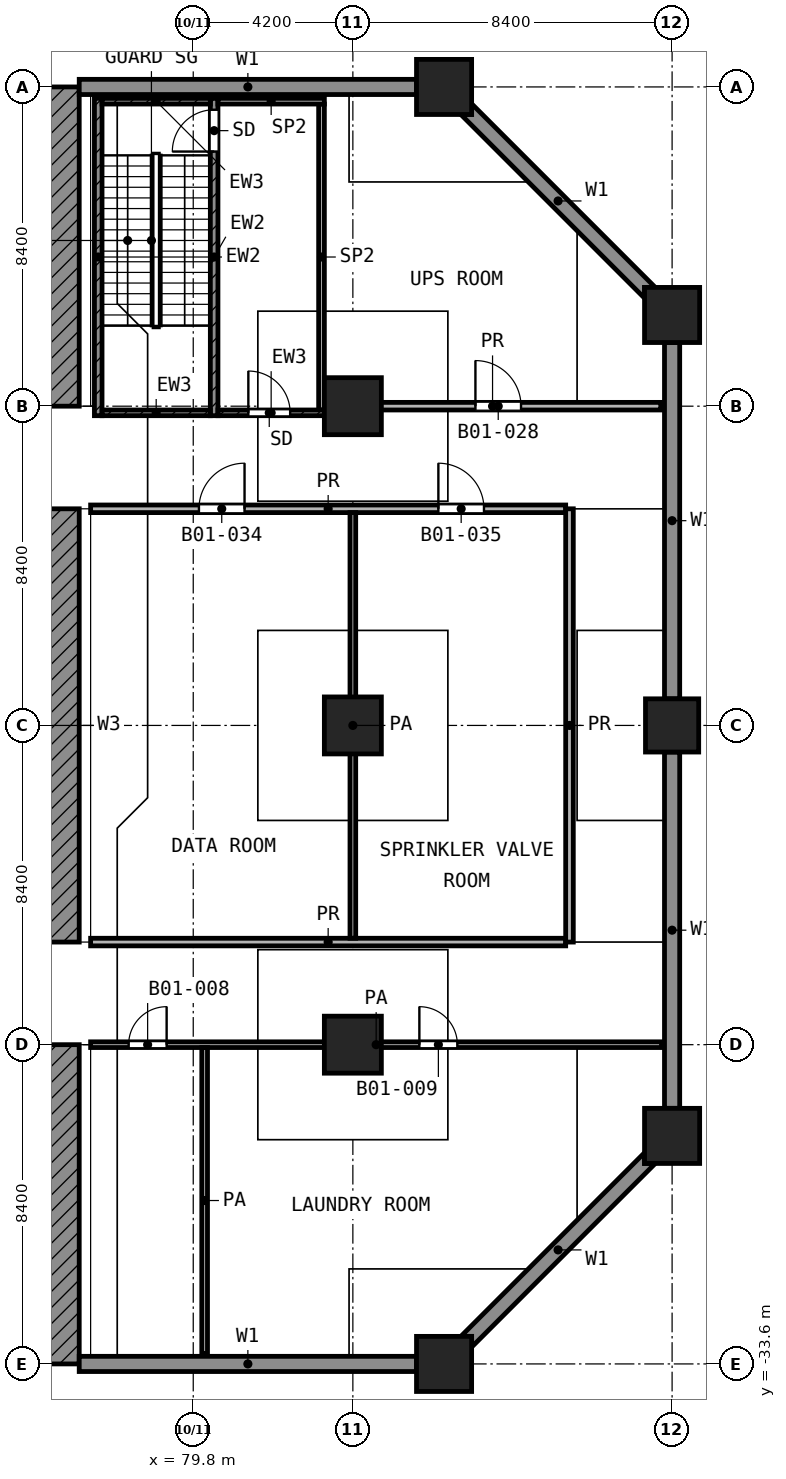
"""IFC4 building model, lengths in metres.
Left out: names, types, materials, properties, quantities, classifications, styles, units other than length and angle.
Written with IfcOpenShell. Run it as: python <this file> out.ifc"""

import sys

from ifc_helpers import new_model, si_unit, direction, frame, frame_2d, origin, origin_2d, place, context, subcontext, project, spatial, polyline, rectangle, outline, extrude, element, fill, save


model = new_model("IFC4")
c1 = context("Model", 3, precision=1e-05, world=origin(), true_north=direction((0.0, 1.0)))
c2 = subcontext(c1, "Body", "Model", "MODEL_VIEW")
j1 = project(units=[si_unit("LENGTHUNIT", "METRE"), si_unit("PLANEANGLEUNIT", "RADIAN")], contexts=[c1])
p1 = place(None, origin())
s1 = spatial("IfcSite", under=j1, at=p1, CompositionType="ELEMENT")
p2 = place(p1, origin())
s2 = spatial("IfcBuilding", under=s1, at=p2, CompositionType="ELEMENT")
p3 = place(p2, frame((0.0, 0.0, -6.0)))
s3 = spatial("IfcBuildingStorey", under=s2, at=p3, CompositionType="ELEMENT", Elevation=-6.0)
p4 = place(p3, origin())
e1 = element("IfcWall", 1, at=p4, inside=s3, PredefinedType="SOLIDWALL", context=c2, shape_type="SweptSolid", body=[
    extrude(outline(polyline([(85.675, -0.2), (76.8, -0.2), (76.8, 0.2), (85.675, 0.2), (85.675, -0.2)])), origin(), (0.0, 0.0, 1.0), 5.55),
])
e2 = element("IfcWall", 2, at=p4, inside=s3, PredefinedType="SOLIDWALL", context=c2, shape_type="SweptSolid", body=[
    extrude(outline(polyline([(91.675, -5.275), (91.675, -5.558), (86.842, -0.725), (87.125, -0.725), (87.125, -0.442), (91.958, -5.275), (91.675, -5.275)])), origin(), (0.0, 0.0, 1.0), 5.55),
])
e3 = element("IfcWall", 3, at=p4, inside=s3, PredefinedType="SOLIDWALL", context=c2, shape_type="SweptSolid", body=[
    extrude(outline(polyline([(92.2, -16.1), (92.2, -6.725), (92.6, -6.725), (92.6, -16.1), (92.2, -16.1)])), origin(), (0.0, 0.0, 1.0), 5.55),
])
e4 = element("IfcWall", 4, at=p4, inside=s3, PredefinedType="SOLIDWALL", context=c2, shape_type="SweptSolid", body=[
    extrude(outline(polyline([(92.2, -26.875), (92.2, -17.5), (92.6, -17.5), (92.6, -26.875), (92.2, -26.875)])), origin(), (0.0, 0.0, 1.0), 5.55),
])
e5 = element("IfcWall", 5, at=p4, inside=s3, PredefinedType="SOLIDWALL", context=c2, shape_type="SweptSolid", body=[
    extrude(outline(polyline([(87.125, -32.875), (86.842, -32.875), (91.675, -28.042), (91.675, -28.325), (91.958, -28.325), (87.125, -33.158), (87.125, -32.875)])), origin(), (0.0, 0.0, 1.0), 5.55),
])
e6 = element("IfcWall", 6, at=p4, inside=s3, PredefinedType="SOLIDWALL", context=c2, shape_type="SweptSolid", body=[
    extrude(outline(polyline([(76.8, -33.4), (85.675, -33.4), (85.675, -33.8), (76.8, -33.8), (76.8, -33.4)])), origin(), (0.0, 0.0, 1.0), 5.55),
])
for number, where, z_axis, x_axis in (
    (7, (86.4, 0.0, 0.0), (0.0, 0.0, 1.0), (1.0, 0.0, 0.0)),
    (8, (92.4, -6.0, 0.0), (0.0, 0.0, 1.0), (1.0, 0.0, 0.0)),
):
    element("IfcColumn", number, at=place(p3, frame(where, z_axis=z_axis, x_axis=x_axis)), inside=s3, PredefinedType="COLUMN", context=c2, shape_type="SweptSolid", body=[
        extrude(rectangle(XDim=1.45, YDim=1.45, at=origin_2d()), origin(), (0.0, 0.0, 1.0), 6.0),
    ])
for number, where, z_axis, x_axis in (
    (9, (84.0, -8.4, 0.0), (0.0, 0.0, 1.0), (1.0, 0.0, 0.0)),
    (10, (84.0, -16.8, 0.0), (0.0, 0.0, 1.0), (1.0, 0.0, 0.0)),
):
    element("IfcColumn", number, at=place(p3, frame(where, z_axis=z_axis, x_axis=x_axis)), inside=s3, PredefinedType="COLUMN", context=c2, shape_type="SweptSolid", body=[
        extrude(rectangle(XDim=1.5, YDim=1.5, at=origin_2d()), origin(), (0.0, 0.0, 1.0), 6.0),
    ])
p5 = place(p3, frame((92.4, -16.8, 0.0), z_axis=(0.0, 0.0, 1.0), x_axis=(1.0, 0.0, 0.0)))
e11 = element("IfcColumn", 11, at=p5, inside=s3, PredefinedType="COLUMN", context=c2, shape_type="SweptSolid", body=[
    extrude(rectangle(XDim=1.4, YDim=1.4, at=origin_2d()), origin(), (0.0, 0.0, 1.0), 6.0),
])
p6 = place(p3, frame((84.0, -25.2, 0.0), z_axis=(0.0, 0.0, 1.0), x_axis=(1.0, 0.0, 0.0)))
e12 = element("IfcColumn", 12, at=p6, inside=s3, PredefinedType="COLUMN", context=c2, shape_type="SweptSolid", body=[
    extrude(rectangle(XDim=1.5, YDim=1.5, at=origin_2d()), origin(), (0.0, 0.0, 1.0), 6.0),
])
for number, where, z_axis, x_axis in (
    (13, (92.4, -27.6, 0.0), (0.0, 0.0, 1.0), (1.0, 0.0, 0.0)),
    (14, (86.4, -33.6, 0.0), (0.0, 0.0, 1.0), (1.0, 0.0, 0.0)),
):
    element("IfcColumn", number, at=place(p3, frame(where, z_axis=z_axis, x_axis=x_axis)), inside=s3, PredefinedType="COLUMN", context=c2, shape_type="SweptSolid", body=[
        extrude(rectangle(XDim=1.45, YDim=1.45, at=origin_2d()), origin(), (0.0, 0.0, 1.0), 6.0),
    ])
p7 = place(p3, frame((0.0, 0.0, 6.0), z_axis=(0.0, -1.0, 0.0), x_axis=(1.0, 0.0, 0.0)))
e15 = element("IfcWall", 15, at=p7, inside=s3, PredefinedType="SHEAR", context=c2, shape_type="SweptSolid", body=[
    extrude(outline(polyline([(74.4, -6.0), (74.4, 0.0), (76.8, 0.0), (76.8, -6.0), (74.4, -6.0)])), origin(), (0.0, 0.0, 1.0), 8.4),
])
p8 = place(p3, frame((0.0, -11.1, 6.0), z_axis=(0.0, -1.0, 0.0), x_axis=(1.0, 0.0, 0.0)))
e16 = element("IfcWall", 16, at=p8, inside=s3, PredefinedType="SHEAR", context=c2, shape_type="SweptSolid", body=[
    extrude(outline(polyline([(74.4, -6.0), (74.4, 0.0), (76.8, 0.0), (76.8, -6.0), (74.4, -6.0)])), origin(), (0.0, 0.0, 1.0), 11.4),
])
p9 = place(p3, frame((0.0, -25.2, 6.0), z_axis=(0.0, -1.0, 0.0), x_axis=(1.0, 0.0, 0.0)))
e17 = element("IfcWall", 17, at=p9, inside=s3, PredefinedType="SHEAR", context=c2, shape_type="SweptSolid", body=[
    extrude(outline(polyline([(74.4, -6.0), (74.4, 0.0), (76.8, 0.0), (76.8, -6.0), (74.4, -6.0)])), origin(), (0.0, 0.0, 1.0), 8.4),
])
p10 = place(p3, frame((77.3, -8.65, 0.0), z_axis=(0.0, 0.0, 1.0), x_axis=(0.0, 1.0, 0.0)))
e18 = element("IfcWall", 18, at=p10, inside=s3, PredefinedType="SHEAR", context=c2, shape_type="SweptSolid", body=[
    extrude(rectangle(XDim=8.35, YDim=0.2, at=frame_2d((4.175, 0.0))), origin(), (0.0, 0.0, 1.0), 5.55),
])
p11 = place(p3, frame((80.35, -8.65, 0.0), z_axis=(0.0, 0.0, 1.0), x_axis=(0.0, 1.0, 0.0)))
e19 = element("IfcWall", 19, at=p11, inside=s3, PredefinedType="SHEAR", context=c2, shape_type="SweptSolid", body=[
    extrude(rectangle(XDim=8.35, YDim=0.2, at=frame_2d((4.175, 0.0))), origin(), (0.0, 0.0, 1.0), 5.55),
])
p12 = place(p11, frame((6.95, 0.0, 0.0)))
e20 = element("IfcOpeningElement", 20, at=p12, cuts=e19, PredefinedType="OPENING", context=c2, shape_type="SweptSolid", body=[
    extrude(rectangle(XDim=1.1, YDim=2.1, at=frame_2d((0.55, 1.05))), frame((0.0, 0.11, 0.0), z_axis=(0.0, -1.0, 0.0), x_axis=(1.0, 0.0, 0.0)), (0.0, 0.0, 1.0), 0.22),
])
p13 = place(p3, frame((77.4, -0.375, 0.0), z_axis=(0.0, 0.0, 1.0), x_axis=(1.0, 0.0, 0.0)))
e21 = element("IfcWall", 21, at=p13, inside=s3, PredefinedType="SHEAR", context=c2, shape_type="SweptSolid", body=[
    extrude(rectangle(XDim=2.85, YDim=0.15, at=frame_2d((1.425, 0.0))), origin(), (0.0, 0.0, 1.0), 5.55),
])
p14 = place(p3, frame((80.45, -0.375, 0.0), z_axis=(0.0, 0.0, 1.0), x_axis=(1.0, 0.0, 0.0)))
e22 = element("IfcWall", 22, at=p14, inside=s3, PredefinedType="PARTITIONING", context=c2, shape_type="SweptSolid", body=[
    extrude(rectangle(XDim=2.8, YDim=0.15, at=frame_2d((1.4, 0.0))), origin(), (0.0, 0.0, 1.0), 5.55),
])
p15 = place(p3, frame((77.4, -8.575, 0.0), z_axis=(0.0, 0.0, 1.0), x_axis=(1.0, 0.0, 0.0)))
e23 = element("IfcWall", 23, at=p15, inside=s3, PredefinedType="SHEAR", context=c2, shape_type="SweptSolid", body=[
    extrude(rectangle(XDim=2.85, YDim=0.15, at=frame_2d((1.425, 0.0))), origin(), (0.0, 0.0, 1.0), 5.55),
])
p16 = place(p3, frame((80.45, -8.575, 0.0), z_axis=(0.0, 0.0, 1.0), x_axis=(1.0, 0.0, 0.0)))
e24 = element("IfcWall", 24, at=p16, inside=s3, PredefinedType="SHEAR", context=c2, shape_type="SweptSolid", body=[
    extrude(rectangle(XDim=2.8, YDim=0.15, at=frame_2d((1.4, 0.0))), origin(), (0.0, 0.0, 1.0), 5.55),
])
p17 = place(p16, frame((0.8, 0.0, 0.0)))
e25 = element("IfcOpeningElement", 25, at=p17, cuts=e24, PredefinedType="OPENING", context=c2, shape_type="SweptSolid", body=[
    extrude(rectangle(XDim=1.1, YDim=2.1, at=frame_2d((0.55, 1.05))), frame((0.0, 0.085, 0.0), z_axis=(0.0, -1.0, 0.0), x_axis=(1.0, 0.0, 0.0)), (0.0, 0.0, 1.0), 0.17),
])
p18 = place(p3, frame((83.175, -8.5, 0.0), z_axis=(0.0, 0.0, 1.0), x_axis=(0.0, 1.0, 0.0)))
e26 = element("IfcWall", 26, at=p18, inside=s3, PredefinedType="PARTITIONING", context=c2, shape_type="SweptSolid", body=[
    extrude(rectangle(XDim=8.05, YDim=0.15, at=frame_2d((4.025, 0.0))), origin(), (0.0, 0.0, 1.0), 5.55),
])
p19 = place(p3, frame((77.1, -25.2, 0.0), z_axis=(0.0, 0.0, 1.0), x_axis=(1.0, 0.0, 0.0)))
e27 = element("IfcWall", 27, at=p19, inside=s3, PredefinedType="PARTITIONING", context=c2, shape_type="SweptSolid", body=[
    extrude(rectangle(XDim=15.026, YDim=0.15, at=frame_2d((7.513, 0.0))), origin(), (0.0, 0.0, 1.0), 5.55),
])
p20 = place(p19, frame((1.0, 0.0, 0.0)))
e28 = element("IfcOpeningElement", 28, at=p20, cuts=e27, PredefinedType="OPENING", context=c2, shape_type="SweptSolid", body=[
    extrude(rectangle(XDim=1.0, YDim=2.1, at=frame_2d((0.5, 1.05))), frame((0.0, 0.085, 0.0), z_axis=(0.0, -1.0, 0.0), x_axis=(1.0, 0.0, 0.0)), (0.0, 0.0, 1.0), 0.17),
])
p21 = place(p19, frame((8.65, 0.0, 0.0)))
e29 = element("IfcOpeningElement", 29, at=p21, cuts=e27, PredefinedType="OPENING", context=c2, shape_type="SweptSolid", body=[
    extrude(rectangle(XDim=1.0, YDim=2.1, at=frame_2d((0.5, 1.05))), frame((0.0, 0.085, 0.0), z_axis=(0.0, -1.0, 0.0), x_axis=(1.0, 0.0, 0.0)), (0.0, 0.0, 1.0), 0.17),
])
p22 = place(p3, frame((80.1, -33.326, 0.0), z_axis=(0.0, 0.0, 1.0), x_axis=(0.0, 1.0, 0.0)))
e30 = element("IfcWall", 30, at=p22, inside=s3, PredefinedType="PARTITIONING", context=c2, shape_type="SweptSolid", body=[
    extrude(rectangle(XDim=8.051, YDim=0.15, at=frame_2d((4.025, 0.0))), origin(), (0.0, 0.0, 1.0), 5.55),
])
p23 = place(p3, frame((84.0, -22.4, 0.0), z_axis=(0.0, 0.0, 1.0), x_axis=(0.0, 1.0, 0.0)))
e31 = element("IfcWall", 31, at=p23, inside=s3, PredefinedType="PARTITIONING", context=c2, shape_type="SweptSolid", body=[
    extrude(rectangle(XDim=11.2, YDim=0.15, at=frame_2d((5.6, 0.0))), origin(), (0.0, 0.0, 1.0), 5.55),
])
p24 = place(p3, frame((77.1, -22.5, 0.0), z_axis=(0.0, 0.0, 1.0), x_axis=(1.0, 0.0, 0.0)))
e32 = element("IfcWall", 32, at=p24, inside=s3, PredefinedType="PARTITIONING", context=c2, shape_type="SweptSolid", body=[
    extrude(rectangle(XDim=12.5, YDim=0.2, at=frame_2d((6.25, 0.0))), origin(), (0.0, 0.0, 1.0), 5.55),
])
p25 = place(p3, frame((77.1, -11.1, 0.0), z_axis=(0.0, 0.0, 1.0), x_axis=(1.0, 0.0, 0.0)))
e33 = element("IfcWall", 33, at=p25, inside=s3, PredefinedType="PARTITIONING", context=c2, shape_type="SweptSolid", body=[
    extrude(rectangle(XDim=12.5, YDim=0.2, at=frame_2d((6.25, 0.0))), origin(), (0.0, 0.0, 1.0), 5.55),
])
p26 = place(p25, frame((2.85, 0.0, 0.0)))
e34 = element("IfcOpeningElement", 34, at=p26, cuts=e33, PredefinedType="OPENING", context=c2, shape_type="SweptSolid", body=[
    extrude(rectangle(XDim=1.2, YDim=2.1, at=frame_2d((0.6, 1.05))), frame((0.0, 0.11, 0.0), z_axis=(0.0, -1.0, 0.0), x_axis=(1.0, 0.0, 0.0)), (0.0, 0.0, 1.0), 0.22),
])
p27 = place(p25, frame((9.15, 0.0, 0.0)))
e35 = element("IfcOpeningElement", 35, at=p27, cuts=e33, PredefinedType="OPENING", context=c2, shape_type="SweptSolid", body=[
    extrude(rectangle(XDim=1.2, YDim=2.1, at=frame_2d((0.6, 1.05))), frame((0.0, 0.11, 0.0), z_axis=(0.0, -1.0, 0.0), x_axis=(1.0, 0.0, 0.0)), (0.0, 0.0, 1.0), 0.22),
])
p28 = place(p3, frame((83.25, -8.4, 0.0), z_axis=(0.0, 0.0, 1.0), x_axis=(1.0, 0.0, 0.0)))
e36 = element("IfcWall", 36, at=p28, inside=s3, PredefinedType="PARTITIONING", context=c2, shape_type="SweptSolid", body=[
    extrude(rectangle(XDim=8.851, YDim=0.2, at=frame_2d((4.426, 0.0))), origin(), (0.0, 0.0, 1.0), 5.55),
])
p29 = place(p28, frame((3.975, 0.0, 0.0)))
e37 = element("IfcOpeningElement", 37, at=p29, cuts=e36, PredefinedType="OPENING", context=c2, shape_type="SweptSolid", body=[
    extrude(rectangle(XDim=1.2, YDim=2.1, at=frame_2d((0.6, 1.05))), frame((0.0, 0.11, 0.0), z_axis=(0.0, -1.0, 0.0), x_axis=(1.0, 0.0, 0.0)), (0.0, 0.0, 1.0), 0.22),
])
p30 = place(p3, frame((89.7, -22.5, 0.0), z_axis=(0.0, 0.0, 1.0), x_axis=(0.0, 1.0, 0.0)))
e38 = element("IfcWall", 38, at=p30, inside=s3, PredefinedType="PARTITIONING", context=c2, shape_type="SweptSolid", body=[
    extrude(rectangle(XDim=11.4, YDim=0.2, at=frame_2d((5.7, 0.0))), origin(), (0.0, 0.0, 1.0), 5.55),
])
p31 = place(p12, origin())
e39 = element("IfcDoor", 39, at=p31, inside=s3, OperationType="SINGLE_SWING_LEFT", PredefinedType="DOOR", context=c2, shape_type="SweptSolid", body=[
    extrude(rectangle(XDim=1.1, YDim=2.1, at=frame_2d((0.55, 1.05))), frame((0.0, 0.025, 0.0), z_axis=(0.0, -1.0, 0.0), x_axis=(1.0, 0.0, 0.0)), (0.0, 0.0, 1.0), 0.05),
])
fill(e20, e39)
p32 = place(p17, origin())
e40 = element("IfcDoor", 40, at=p32, inside=s3, OperationType="SINGLE_SWING_LEFT", PredefinedType="DOOR", context=c2, shape_type="SweptSolid", body=[
    extrude(rectangle(XDim=1.1, YDim=2.1, at=frame_2d((0.55, 1.05))), frame((0.0, 0.025, 0.0), z_axis=(0.0, -1.0, 0.0), x_axis=(1.0, 0.0, 0.0)), (0.0, 0.0, 1.0), 0.05),
])
fill(e25, e40)
p33 = place(p29, origin())
e41 = element("IfcDoor", 41, at=p33, inside=s3, OperationType="SINGLE_SWING_LEFT", PredefinedType="DOOR", context=c2, shape_type="SweptSolid", body=[
    extrude(rectangle(XDim=1.2, YDim=2.1, at=frame_2d((0.6, 1.05))), frame((0.0, 0.025, 0.0), z_axis=(0.0, -1.0, 0.0), x_axis=(1.0, 0.0, 0.0)), (0.0, 0.0, 1.0), 0.05),
])
fill(e37, e41)
p34 = place(p26, origin())
e42 = element("IfcDoor", 42, at=p34, inside=s3, OperationType="SINGLE_SWING_RIGHT", PredefinedType="DOOR", context=c2, shape_type="SweptSolid", body=[
    extrude(rectangle(XDim=1.2, YDim=2.1, at=frame_2d((0.6, 1.05))), frame((0.0, 0.025, 0.0), z_axis=(0.0, -1.0, 0.0), x_axis=(1.0, 0.0, 0.0)), (0.0, 0.0, 1.0), 0.05),
])
fill(e34, e42)
p35 = place(p27, origin())
e43 = element("IfcDoor", 43, at=p35, inside=s3, OperationType="SINGLE_SWING_LEFT", PredefinedType="DOOR", context=c2, shape_type="SweptSolid", body=[
    extrude(rectangle(XDim=1.2, YDim=2.1, at=frame_2d((0.6, 1.05))), frame((0.0, 0.025, 0.0), z_axis=(0.0, -1.0, 0.0), x_axis=(1.0, 0.0, 0.0)), (0.0, 0.0, 1.0), 0.05),
])
fill(e35, e43)
p36 = place(p20, origin())
e44 = element("IfcDoor", 44, at=p36, inside=s3, OperationType="SINGLE_SWING_RIGHT", PredefinedType="DOOR", context=c2, shape_type="SweptSolid", body=[
    extrude(rectangle(XDim=1.0, YDim=2.1, at=frame_2d((0.5, 1.05))), frame((0.0, 0.025, 0.0), z_axis=(0.0, -1.0, 0.0), x_axis=(1.0, 0.0, 0.0)), (0.0, 0.0, 1.0), 0.05),
])
fill(e28, e44)
p37 = place(p21, origin())
e45 = element("IfcDoor", 45, at=p37, inside=s3, OperationType="SINGLE_SWING_LEFT", PredefinedType="DOOR", context=c2, shape_type="SweptSolid", body=[
    extrude(rectangle(XDim=1.0, YDim=2.1, at=frame_2d((0.5, 1.05))), frame((0.0, 0.025, 0.0), z_axis=(0.0, -1.0, 0.0), x_axis=(1.0, 0.0, 0.0)), (0.0, 0.0, 1.0), 0.05),
])
fill(e29, e45)
save(model, sys.argv[1])
